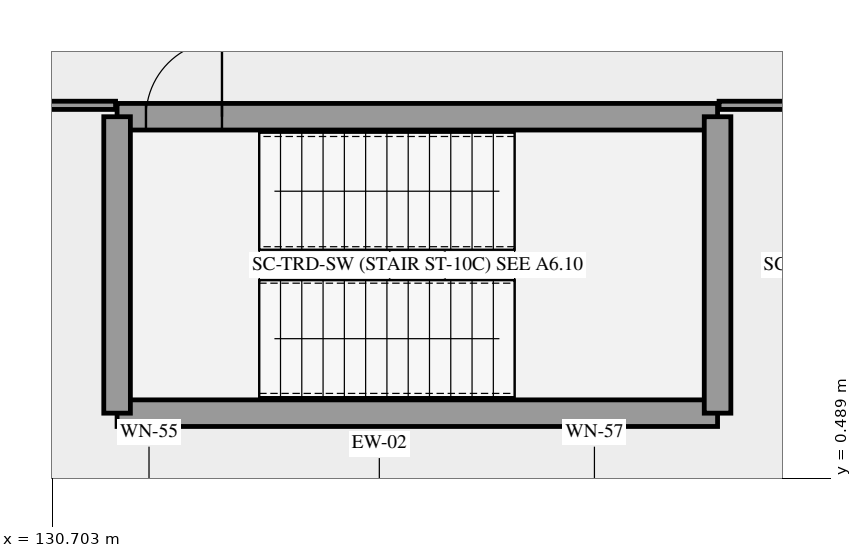
"""IFC4 building model, lengths in metres.
Left out: names, types, materials, properties, quantities, classifications, styles, units other than length and angle.
Written with IfcOpenShell. Run it as: python <this file> out.ifc"""

import sys

from ifc_helpers import new_model, si_unit, direction, frame, frame_2d, origin, place, context, subcontext, project, spatial, rectangle, extrude, element, fill, save


model = new_model("IFC4")
c1 = context("Model", 3, precision=1e-05, world=origin(), true_north=direction((0.0, 1.0)))
c2 = subcontext(c1, "Body", "Model", "MODEL_VIEW")
j1 = project(units=[si_unit("LENGTHUNIT", "METRE"), si_unit("PLANEANGLEUNIT", "RADIAN")], contexts=[c1])
p1 = place(None, origin())
s1 = spatial("IfcSite", under=j1, at=p1, CompositionType="ELEMENT")
p2 = place(p1, origin())
s2 = spatial("IfcBuilding", under=s1, at=p2, CompositionType="ELEMENT")
p3 = place(p2, frame((0.0, 0.0, 10.08)))
s3 = spatial("IfcBuildingStorey", under=s2, at=p3, CompositionType="ELEMENT", Elevation=10.08)
p4 = place(p3, frame((131.55, 1.35, 0.0), z_axis=(0.0, 0.0, 1.0), x_axis=(1.0, 0.0, 0.0)))
e1 = element("IfcWall", 1, at=p4, inside=s3, PredefinedType="SHEAR", context=c2, shape_type="SweptSolid", body=[
    extrude(rectangle(XDim=7.9, YDim=0.35, at=frame_2d((3.95, 0.0))), origin(), (0.0, 0.0, 1.0), 4.68),
])
p5 = place(p3, frame((131.55, 5.25, 0.0), z_axis=(0.0, 0.0, 1.0), x_axis=(1.0, 0.0, 0.0)))
e2 = element("IfcWall", 2, at=p5, inside=s3, PredefinedType="SHEAR", context=c2, shape_type="SweptSolid", body=[
    extrude(rectangle(XDim=7.9, YDim=0.35, at=frame_2d((3.95, 0.0))), origin(), (0.0, 0.0, 1.0), 4.68),
])
p6 = place(p5, frame((0.38, 0.0, 0.0)))
e3 = element("IfcOpeningElement", 3, at=p6, cuts=e2, PredefinedType="OPENING", context=c2, shape_type="SweptSolid", body=[
    extrude(rectangle(XDim=1.0, YDim=2.15, at=frame_2d((0.5, 1.075))), frame((0.0, 0.185, 0.0), z_axis=(0.0, -1.0, 0.0), x_axis=(1.0, 0.0, 0.0)), (0.0, 0.0, 1.0), 0.37),
])
for number, where, z_axis, x_axis in (
    (4, (131.55, 1.35, 0.0), (0.0, 0.0, 1.0), (0.0, 1.0, 0.0)),
    (5, (139.45, 1.35, 0.0), (0.0, 0.0, 1.0), (0.0, 1.0, 0.0)),
):
    element("IfcWall", number, at=place(p3, frame(where, z_axis=z_axis, x_axis=x_axis)), inside=s3, PredefinedType="SHEAR", context=c2, shape_type="SweptSolid", body=[
        extrude(rectangle(XDim=3.9, YDim=0.35, at=frame_2d((1.95, 0.0))), origin(), (0.0, 0.0, 1.0), 4.68),
    ])
p7 = place(p3, frame((129.732, 5.4, 0.0), z_axis=(0.0, 0.0, 1.0), x_axis=(1.0, 0.0, 0.0)))
e6 = element("IfcWall", 6, at=p7, inside=s3, PredefinedType="PARTITIONING", context=c2, shape_type="SweptSolid", body=[
    extrude(rectangle(XDim=1.798, YDim=0.108, at=frame_2d((0.899, 0.0))), origin(), (0.0, 0.0, 1.0), 3.23),
])
p8 = place(p3, frame((139.47, 5.4, 0.0), z_axis=(0.0, 0.0, 1.0), x_axis=(1.0, 0.0, 0.0)))
e7 = element("IfcWall", 7, at=p8, inside=s3, PredefinedType="PARTITIONING", context=c2, shape_type="SweptSolid", body=[
    extrude(rectangle(XDim=1.86, YDim=0.108, at=frame_2d((0.93, 0.0))), origin(), (0.0, 0.0, 1.0), 3.23),
])
p9 = place(p6, origin())
e8 = element("IfcDoor", 8, at=p9, inside=s3, OperationType="SINGLE_SWING_RIGHT", PredefinedType="DOOR", context=c2, shape_type="SweptSolid", body=[
    extrude(rectangle(XDim=1.0, YDim=2.15, at=frame_2d((0.5, 1.075))), frame((0.0, 0.025, 0.0), z_axis=(0.0, -1.0, 0.0), x_axis=(1.0, 0.0, 0.0)), (0.0, 0.0, 1.0), 0.05),
])
fill(e3, e8)
save(model, sys.argv[1])
